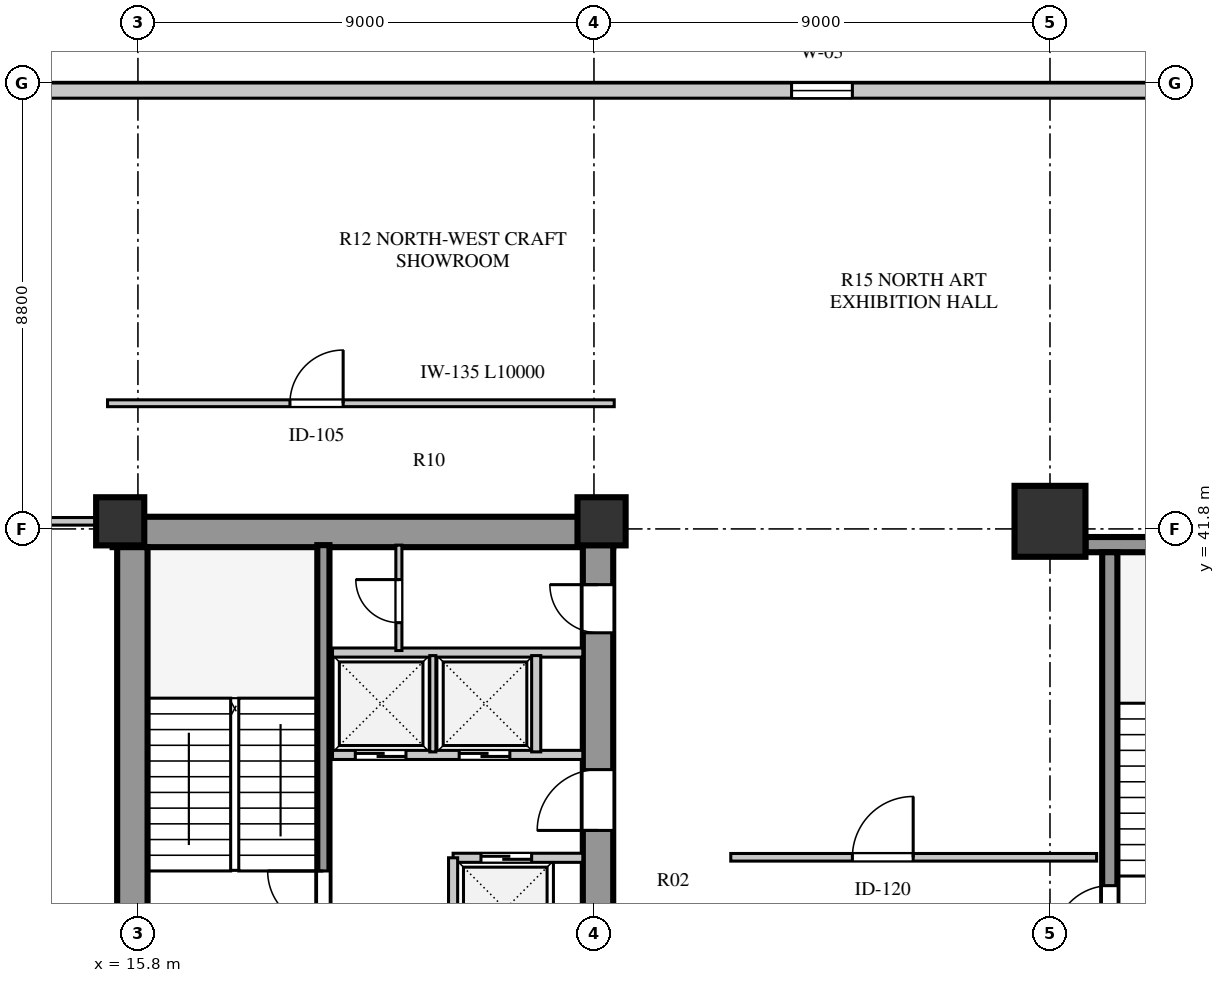
"""IFC4 building model, lengths in metres.
Left out: names, types, materials, properties, quantities, classifications, styles, units other than length and angle.
Written with IfcOpenShell. Run it as: python <this file> out.ifc"""

import sys

from ifc_helpers import new_model, si_unit, direction, frame, frame_2d, origin, origin_2d, place, context, subcontext, project, spatial, rectangle, extrude, element, fill, save


model = new_model("IFC4")
c1 = context("Model", 3, precision=1e-05, world=origin(), true_north=direction((0.0, 1.0)))
c2 = subcontext(c1, "Body", "Model", "MODEL_VIEW")
j1 = project(units=[si_unit("LENGTHUNIT", "METRE"), si_unit("PLANEANGLEUNIT", "RADIAN")], contexts=[c1])
p1 = place(None, origin())
s1 = spatial("IfcSite", under=j1, at=p1, CompositionType="ELEMENT")
p2 = place(p1, origin())
s2 = spatial("IfcBuilding", under=s1, at=p2, CompositionType="ELEMENT")
p3 = place(p2, frame((0.0, 0.0, 12.5)))
s3 = spatial("IfcBuildingStorey", under=s2, at=p3, CompositionType="ELEMENT", Elevation=12.5)
p4 = place(p3, frame((15.3, 41.74, 0.0), z_axis=(0.0, 0.0, 1.0), x_axis=(1.0, 0.0, 0.0)))
e1 = element("IfcWall", 1, at=p4, inside=s3, PredefinedType="SHEAR", context=c2, shape_type="SweptSolid", body=[
    extrude(rectangle(XDim=9.88, YDim=0.6, at=frame_2d((4.94, 0.0))), origin(), (0.0, 0.0, 1.0), 4.22),
])
p5 = place(p3, frame((15.69, 15.81, 0.0), z_axis=(0.0, 0.0, 1.0), x_axis=(0.0, 1.0, 0.0)))
e2 = element("IfcWall", 2, at=p5, inside=s3, PredefinedType="SHEAR", context=c2, shape_type="SweptSolid", body=[
    extrude(rectangle(XDim=25.63, YDim=0.6, at=frame_2d((12.815, 0.0))), origin(), (0.0, 0.0, 1.0), 4.22),
])
p6 = place(p3, frame((24.88, 15.74, 0.0), z_axis=(0.0, 0.0, 1.0), x_axis=(0.0, 1.0, 0.0)))
e3 = element("IfcWall", 3, at=p6, inside=s3, PredefinedType="SHEAR", context=c2, shape_type="SweptSolid", body=[
    extrude(rectangle(XDim=25.76, YDim=0.6, at=frame_2d((12.88, 0.0))), origin(), (0.0, 0.0, 1.0), 4.22),
])
p7 = place(p6, frame((1.61, 0.0, 0.0)))
e4 = element("IfcOpeningElement", 4, at=p7, cuts=e3, PredefinedType="OPENING", context=c2, shape_type="SweptSolid", body=[
    extrude(rectangle(XDim=1.2, YDim=2.1, at=frame_2d((0.6, 1.05))), frame((0.0, 0.31, 0.0), z_axis=(0.0, -1.0, 0.0), x_axis=(1.0, 0.0, 0.0)), (0.0, 0.0, 1.0), 0.62),
])
p8 = place(p6, frame((6.78, 0.0, 0.0)))
e5 = element("IfcOpeningElement", 5, at=p8, cuts=e3, PredefinedType="OPENING", context=c2, shape_type="SweptSolid", body=[
    extrude(rectangle(XDim=0.85, YDim=2.06, at=frame_2d((0.425, 1.03))), frame((0.0, 0.31, 0.0), z_axis=(0.0, -1.0, 0.0), x_axis=(1.0, 0.0, 0.0)), (0.0, 0.0, 1.0), 0.62),
])
p9 = place(p6, frame((12.11, 0.0, 0.0)))
e6 = element("IfcOpeningElement", 6, at=p9, cuts=e3, PredefinedType="OPENING", context=c2, shape_type="SweptSolid", body=[
    extrude(rectangle(XDim=1.5, YDim=2.12, at=frame_2d((0.75, 1.06))), frame((0.0, 0.31, 0.0), z_axis=(0.0, -1.0, 0.0), x_axis=(1.0, 0.0, 0.0)), (0.0, 0.0, 1.0), 0.62),
])
p10 = place(p6, frame((20.11, 0.0, 0.0)))
e7 = element("IfcOpeningElement", 7, at=p10, cuts=e3, PredefinedType="OPENING", context=c2, shape_type="SweptSolid", body=[
    extrude(rectangle(XDim=1.2, YDim=2.12, at=frame_2d((0.6, 1.06))), frame((0.0, 0.31, 0.0), z_axis=(0.0, -1.0, 0.0), x_axis=(1.0, 0.0, 0.0)), (0.0, 0.0, 1.0), 0.62),
])
p11 = place(p6, frame((24.01, 0.0, 0.0)))
e8 = element("IfcOpeningElement", 8, at=p11, cuts=e3, PredefinedType="OPENING", context=c2, shape_type="SweptSolid", body=[
    extrude(rectangle(XDim=0.95, YDim=2.1, at=frame_2d((0.475, 1.05))), frame((0.0, 0.31, 0.0), z_axis=(0.0, -1.0, 0.0), x_axis=(1.0, 0.0, 0.0)), (0.0, 0.0, 1.0), 0.62),
])
p12 = place(p3, frame((34.5, 41.49, 0.0), z_axis=(0.0, 0.0, 1.0), x_axis=(1.0, 0.0, 0.0)))
e9 = element("IfcWall", 9, at=p12, inside=s3, PredefinedType="SHEAR", context=c2, shape_type="SweptSolid", body=[
    extrude(rectangle(XDim=4.37, YDim=0.3, at=frame_2d((2.185, 0.0))), origin(), (0.0, 0.0, 1.0), 4.22),
])
p13 = place(p3, frame((34.98, 33.31, 0.0), z_axis=(0.0, 0.0, 1.0), x_axis=(0.0, 1.0, 0.0)))
e10 = element("IfcWall", 10, at=p13, inside=s3, PredefinedType="SHEAR", context=c2, shape_type="SweptSolid", body=[
    extrude(rectangle(XDim=8.03, YDim=0.3, at=frame_2d((4.015, 0.0))), origin(), (0.0, 0.0, 1.0), 4.22),
])
p14 = place(p13, frame((0.35, 0.0, 0.0)))
e11 = element("IfcOpeningElement", 11, at=p14, cuts=e10, PredefinedType="OPENING", context=c2, shape_type="SweptSolid", body=[
    extrude(rectangle(XDim=1.1, YDim=2.1, at=frame_2d((0.55, 1.05))), frame((0.0, 0.16, 0.0), z_axis=(0.0, -1.0, 0.0), x_axis=(1.0, 0.0, 0.0)), (0.0, 0.0, 1.0), 0.32),
])
for number, where, z_axis, x_axis in (
    (12, (15.45, 41.95, 0.0), (0.0, 0.0, 1.0), (1.0, 0.0, 0.0)),
    (13, (24.95, 41.95, 0.0), (0.0, 0.0, 1.0), (1.0, 0.0, 0.0)),
):
    element("IfcColumn", number, at=place(p3, frame(where, z_axis=z_axis, x_axis=x_axis)), inside=s3, PredefinedType="COLUMN", context=c2, shape_type="SweptSolid", body=[
        extrude(rectangle(XDim=0.95, YDim=0.95, at=origin_2d()), origin(), (0.0, 0.0, 1.0), 4.22),
    ])
p15 = place(p3, frame((33.8, 41.95, 0.0), z_axis=(0.0, 0.0, 1.0), x_axis=(1.0, 0.0, 0.0)))
e14 = element("IfcColumn", 14, at=p15, inside=s3, PredefinedType="COLUMN", context=c2, shape_type="SweptSolid", body=[
    extrude(rectangle(XDim=1.4, YDim=1.4, at=origin_2d()), origin(), (0.0, 0.0, 1.0), 4.22),
])
p16 = place(p3, frame((46.3, 50.45, 0.0), z_axis=(0.0, 0.0, 1.0), x_axis=(-1.0, 0.0, 0.0)))
e15 = element("IfcWall", 15, at=p16, inside=s3, PredefinedType="STANDARD", context=c2, shape_type="SweptSolid", body=[
    extrude(rectangle(XDim=34.0, YDim=0.3, at=frame_2d((17.0, 0.0))), origin(), (0.0, 0.0, 1.0), 4.22),
])
p17 = place(p16, frame((16.4, 0.0, 0.8)))
e16 = element("IfcOpeningElement", 16, at=p17, cuts=e15, PredefinedType="OPENING", context=c2, shape_type="SweptSolid", body=[
    extrude(rectangle(XDim=1.2, YDim=1.75, at=frame_2d((0.6, 0.875))), frame((0.0, 0.16, 0.0), z_axis=(0.0, -1.0, 0.0), x_axis=(1.0, 0.0, 0.0)), (0.0, 0.0, 1.0), 0.32),
])
p18 = place(p3, frame((19.46, 33.3, 0.0), z_axis=(0.0, 0.0, 1.0), x_axis=(0.0, 1.0, 0.0)))
e17 = element("IfcWall", 17, at=p18, inside=s3, PredefinedType="SHEAR", context=c2, shape_type="SweptSolid", body=[
    extrude(rectangle(XDim=8.18, YDim=0.24, at=frame_2d((4.09, 0.0))), origin(), (0.0, 0.0, 1.0), 4.5),
])
p19 = place(p18, frame((0.65, 0.0, 0.0)))
e18 = element("IfcOpeningElement", 18, at=p19, cuts=e17, PredefinedType="OPENING", context=c2, shape_type="SweptSolid", body=[
    extrude(rectangle(XDim=1.1, YDim=2.1, at=frame_2d((0.55, 1.05))), frame((0.0, 0.13, 0.0), z_axis=(0.0, -1.0, 0.0), x_axis=(1.0, 0.0, 0.0)), (0.0, 0.0, 1.0), 0.26),
])
p20 = place(p3, frame((22.02, 35.31, 0.0), z_axis=(0.0, 0.0, 1.0), x_axis=(1.0, 0.0, 0.0)))
e19 = element("IfcWall", 19, at=p20, inside=s3, PredefinedType="SOLIDWALL", context=c2, shape_type="SweptSolid", body=[
    extrude(rectangle(XDim=2.56, YDim=0.18, at=frame_2d((1.28, 0.0))), origin(), (0.0, 0.0, 1.0), 4.22),
])
p21 = place(p20, frame((0.55, 0.0, 0.0)))
e20 = element("IfcOpeningElement", 20, at=p21, cuts=e19, PredefinedType="OPENING", context=c2, shape_type="SweptSolid", body=[
    extrude(rectangle(XDim=1.0, YDim=2.1, at=frame_2d((0.5, 1.05))), frame((0.0, 0.1, 0.0), z_axis=(0.0, -1.0, 0.0), x_axis=(1.0, 0.0, 0.0)), (0.0, 0.0, 1.0), 0.2),
])
p22 = place(p3, frame((22.02, 33.3, 0.0), z_axis=(0.0, 0.0, 1.0), x_axis=(0.0, 1.0, 0.0)))
e21 = element("IfcWall", 21, at=p22, inside=s3, PredefinedType="SOLIDWALL", context=c2, shape_type="SweptSolid", body=[
    extrude(rectangle(XDim=2.01, YDim=0.18, at=frame_2d((1.005, 0.0))), origin(), (0.0, 0.0, 1.0), 4.22),
])
p23 = place(p3, frame((19.64, 37.34, 0.0), z_axis=(0.0, 0.0, 1.0), x_axis=(1.0, 0.0, 0.0)))
e22 = element("IfcWall", 22, at=p23, inside=s3, PredefinedType="SOLIDWALL", context=c2, shape_type="SweptSolid", body=[
    extrude(rectangle(XDim=4.94, YDim=0.18, at=frame_2d((2.47, 0.0))), origin(), (0.0, 0.0, 1.0), 4.22),
])
p24 = place(p23, frame((0.45, 0.0, 0.0)))
e23 = element("IfcOpeningElement", 23, at=p24, cuts=e22, PredefinedType="OPENING", context=c2, shape_type="SweptSolid", body=[
    extrude(rectangle(XDim=1.0, YDim=2.1, at=frame_2d((0.5, 1.05))), frame((0.0, 0.1, 0.0), z_axis=(0.0, -1.0, 0.0), x_axis=(1.0, 0.0, 0.0)), (0.0, 0.0, 1.0), 0.2),
])
p25 = place(p23, frame((2.5, 0.0, 0.0)))
e24 = element("IfcOpeningElement", 24, at=p25, cuts=e22, PredefinedType="OPENING", context=c2, shape_type="SweptSolid", body=[
    extrude(rectangle(XDim=1.0, YDim=2.1, at=frame_2d((0.5, 1.05))), frame((0.0, 0.1, 0.0), z_axis=(0.0, -1.0, 0.0), x_axis=(1.0, 0.0, 0.0)), (0.0, 0.0, 1.0), 0.2),
])
p26 = place(p3, frame((19.64, 39.36, 0.0), z_axis=(0.0, 0.0, 1.0), x_axis=(1.0, 0.0, 0.0)))
e25 = element("IfcWall", 25, at=p26, inside=s3, PredefinedType="SOLIDWALL", context=c2, shape_type="SweptSolid", body=[
    extrude(rectangle(XDim=4.94, YDim=0.18, at=frame_2d((2.47, 0.0))), origin(), (0.0, 0.0, 1.0), 4.22),
])
p27 = place(p3, frame((21.62, 37.4, 0.0), z_axis=(0.0, 0.0, 1.0), x_axis=(0.0, 1.0, 0.0)))
e26 = element("IfcWall", 26, at=p27, inside=s3, PredefinedType="PARTITIONING", context=c2, shape_type="SweptSolid", body=[
    extrude(rectangle(XDim=1.9, YDim=0.12, at=frame_2d((0.95, 0.0))), origin(), (0.0, 0.0, 1.0), 4.22),
])
p28 = place(p3, frame((23.66, 37.4, 0.0), z_axis=(0.0, 0.0, 1.0), x_axis=(0.0, 1.0, 0.0)))
e27 = element("IfcWall", 27, at=p28, inside=s3, PredefinedType="SOLIDWALL", context=c2, shape_type="SweptSolid", body=[
    extrude(rectangle(XDim=1.9, YDim=0.18, at=frame_2d((0.95, 0.0))), origin(), (0.0, 0.0, 1.0), 4.22),
])
p29 = place(p3, frame((20.95, 39.4, 0.0), z_axis=(0.0, 0.0, 1.0), x_axis=(0.0, 1.0, 0.0)))
e28 = element("IfcWall", 28, at=p29, inside=s3, PredefinedType="PARTITIONING", context=c2, shape_type="SweptSolid", body=[
    extrude(rectangle(XDim=2.08, YDim=0.12, at=frame_2d((1.04, 0.0))), origin(), (0.0, 0.0, 1.0), 4.22),
])
p30 = place(p29, frame((0.55, 0.0, 0.0)))
e29 = element("IfcOpeningElement", 29, at=p30, cuts=e28, PredefinedType="OPENING", context=c2, shape_type="SweptSolid", body=[
    extrude(rectangle(XDim=0.85, YDim=2.06, at=frame_2d((0.425, 1.03))), frame((0.0, 0.07, 0.0), z_axis=(0.0, -1.0, 0.0), x_axis=(1.0, 0.0, 0.0)), (0.0, 0.0, 1.0), 0.14),
])
p31 = place(p3, frame((6.88, 41.95, 0.0), z_axis=(0.0, 0.0, 1.0), x_axis=(1.0, 0.0, 0.0)))
e30 = element("IfcWall", 30, at=p31, inside=s3, PredefinedType="PARTITIONING", context=c2, shape_type="SweptSolid", body=[
    extrude(rectangle(XDim=8.32, YDim=0.15, at=frame_2d((4.16, 0.0))), origin(), (0.0, 0.0, 1.0), 3.72),
])
p32 = place(p3, frame((15.2, 44.28, 0.0), z_axis=(0.0, 0.0, 1.0), x_axis=(1.0, 0.0, 0.0)))
e31 = element("IfcWall", 31, at=p32, inside=s3, PredefinedType="PARTITIONING", context=c2, shape_type="SweptSolid", body=[
    extrude(rectangle(XDim=10.0, YDim=0.135, at=frame_2d((5.0, 0.0))), origin(), (0.0, 0.0, 1.0), 4.22),
])
p33 = place(p32, frame((3.6, 0.0, 0.0)))
e32 = element("IfcOpeningElement", 32, at=p33, cuts=e31, PredefinedType="OPENING", context=c2, shape_type="SweptSolid", body=[
    extrude(rectangle(XDim=1.05, YDim=2.1, at=frame_2d((0.525, 1.05))), frame((0.0, 0.078, 0.0), z_axis=(0.0, -1.0, 0.0), x_axis=(1.0, 0.0, 0.0)), (0.0, 0.0, 1.0), 0.155),
])
p34 = place(p3, frame((27.5, 35.32, 0.0), z_axis=(0.0, 0.0, 1.0), x_axis=(1.0, 0.0, 0.0)))
e33 = element("IfcWall", 33, at=p34, inside=s3, PredefinedType="PARTITIONING", context=c2, shape_type="SweptSolid", body=[
    extrude(rectangle(XDim=7.22, YDim=0.15, at=frame_2d((3.61, 0.0))), origin(), (0.0, 0.0, 1.0), 4.22),
])
p35 = place(p34, frame((2.4, 0.0, 0.0)))
e34 = element("IfcOpeningElement", 34, at=p35, cuts=e33, PredefinedType="OPENING", context=c2, shape_type="SweptSolid", body=[
    extrude(rectangle(XDim=1.2, YDim=2.1, at=frame_2d((0.6, 1.05))), frame((0.0, 0.085, 0.0), z_axis=(0.0, -1.0, 0.0), x_axis=(1.0, 0.0, 0.0)), (0.0, 0.0, 1.0), 0.17),
])
p36 = place(p17, origin())
e35 = element("IfcWindow", 35, at=p36, inside=s3, PartitioningType="SINGLE_PANEL", PredefinedType="WINDOW", context=c2, shape_type="SweptSolid", body=[
    extrude(rectangle(XDim=1.2, YDim=1.75, at=frame_2d((0.6, 0.875))), frame((0.0, 0.03, 0.0), z_axis=(0.0, -1.0, 0.0), x_axis=(1.0, 0.0, 0.0)), (0.0, 0.0, 1.0), 0.06),
])
fill(e16, e35)
p37 = place(p19, origin())
e36 = element("IfcDoor", 36, at=p37, inside=s3, OperationType="SINGLE_SWING_RIGHT", PredefinedType="DOOR", context=c2, shape_type="SweptSolid", body=[
    extrude(rectangle(XDim=1.1, YDim=2.1, at=frame_2d((0.55, 1.05))), frame((0.0, 0.025, 0.0), z_axis=(0.0, -1.0, 0.0), x_axis=(1.0, 0.0, 0.0)), (0.0, 0.0, 1.0), 0.05),
])
fill(e18, e36)
p38 = place(p10, frame((1.2, 0.0, 0.0), z_axis=(0.0, 0.0, 1.0), x_axis=(-1.0, 0.0, 0.0)))
e37 = element("IfcDoor", 37, at=p38, inside=s3, OperationType="SINGLE_SWING_RIGHT", PredefinedType="DOOR", context=c2, shape_type="SweptSolid", body=[
    extrude(rectangle(XDim=1.2, YDim=2.12, at=frame_2d((0.6, 1.06))), frame((0.0, 0.025, 0.0), z_axis=(0.0, -1.0, 0.0), x_axis=(1.0, 0.0, 0.0)), (0.0, 0.0, 1.0), 0.05),
])
fill(e7, e37)
p39 = place(p24, frame((1.0, 0.0, 0.0), z_axis=(0.0, 0.0, 1.0), x_axis=(-1.0, 0.0, 0.0)))
e38 = element("IfcDoor", 38, at=p39, inside=s3, OperationType="DOUBLE_DOOR_SLIDING", PredefinedType="DOOR", context=c2, shape_type="SweptSolid", body=[
    extrude(rectangle(XDim=1.0, YDim=2.1, at=frame_2d((0.5, 1.05))), frame((0.0, 0.025, 0.0), z_axis=(0.0, -1.0, 0.0), x_axis=(1.0, 0.0, 0.0)), (0.0, 0.0, 1.0), 0.05),
])
fill(e23, e38)
p40 = place(p25, frame((1.0, 0.0, 0.0), z_axis=(0.0, 0.0, 1.0), x_axis=(-1.0, 0.0, 0.0)))
e39 = element("IfcDoor", 39, at=p40, inside=s3, OperationType="DOUBLE_DOOR_SLIDING", PredefinedType="DOOR", context=c2, shape_type="SweptSolid", body=[
    extrude(rectangle(XDim=1.0, YDim=2.1, at=frame_2d((0.5, 1.05))), frame((0.0, 0.025, 0.0), z_axis=(0.0, -1.0, 0.0), x_axis=(1.0, 0.0, 0.0)), (0.0, 0.0, 1.0), 0.05),
])
fill(e24, e39)
p41 = place(p21, origin())
e40 = element("IfcDoor", 40, at=p41, inside=s3, OperationType="DOUBLE_DOOR_SLIDING", PredefinedType="DOOR", context=c2, shape_type="SweptSolid", body=[
    extrude(rectangle(XDim=1.0, YDim=2.1, at=frame_2d((0.5, 1.05))), frame((0.0, 0.025, 0.0), z_axis=(0.0, -1.0, 0.0), x_axis=(1.0, 0.0, 0.0)), (0.0, 0.0, 1.0), 0.05),
])
fill(e20, e40)
p42 = place(p30, origin())
e41 = element("IfcDoor", 41, at=p42, inside=s3, OperationType="SINGLE_SWING_RIGHT", PredefinedType="DOOR", context=c2, shape_type="SweptSolid", body=[
    extrude(rectangle(XDim=0.85, YDim=2.06, at=frame_2d((0.425, 1.03))), frame((0.0, 0.025, 0.0), z_axis=(0.0, -1.0, 0.0), x_axis=(1.0, 0.0, 0.0)), (0.0, 0.0, 1.0), 0.05),
])
fill(e29, e41)
p43 = place(p11, frame((0.95, 0.0, 0.0), z_axis=(0.0, 0.0, 1.0), x_axis=(-1.0, 0.0, 0.0)))
e42 = element("IfcDoor", 42, at=p43, inside=s3, OperationType="SINGLE_SWING_LEFT", PredefinedType="DOOR", context=c2, shape_type="SweptSolid", body=[
    extrude(rectangle(XDim=0.95, YDim=2.1, at=frame_2d((0.475, 1.05))), frame((0.0, 0.025, 0.0), z_axis=(0.0, -1.0, 0.0), x_axis=(1.0, 0.0, 0.0)), (0.0, 0.0, 1.0), 0.05),
])
fill(e8, e42)
p44 = place(p14, origin())
e43 = element("IfcDoor", 43, at=p44, inside=s3, OperationType="SINGLE_SWING_LEFT", PredefinedType="DOOR", context=c2, shape_type="SweptSolid", body=[
    extrude(rectangle(XDim=1.1, YDim=2.1, at=frame_2d((0.55, 1.05))), frame((0.0, 0.025, 0.0), z_axis=(0.0, -1.0, 0.0), x_axis=(1.0, 0.0, 0.0)), (0.0, 0.0, 1.0), 0.05),
])
fill(e11, e43)
p45 = place(p33, origin())
e44 = element("IfcDoor", 44, at=p45, inside=s3, OperationType="SINGLE_SWING_RIGHT", PredefinedType="DOOR", context=c2, shape_type="SweptSolid", body=[
    extrude(rectangle(XDim=1.05, YDim=2.1, at=frame_2d((0.525, 1.05))), frame((0.0, 0.025, 0.0), z_axis=(0.0, -1.0, 0.0), x_axis=(1.0, 0.0, 0.0)), (0.0, 0.0, 1.0), 0.05),
])
fill(e32, e44)
p46 = place(p35, origin())
e45 = element("IfcDoor", 45, at=p46, inside=s3, OperationType="SINGLE_SWING_RIGHT", PredefinedType="DOOR", context=c2, shape_type="SweptSolid", body=[
    extrude(rectangle(XDim=1.2, YDim=2.1, at=frame_2d((0.6, 1.05))), frame((0.0, 0.025, 0.0), z_axis=(0.0, -1.0, 0.0), x_axis=(1.0, 0.0, 0.0)), (0.0, 0.0, 1.0), 0.05),
])
fill(e34, e45)
save(model, sys.argv[1])
